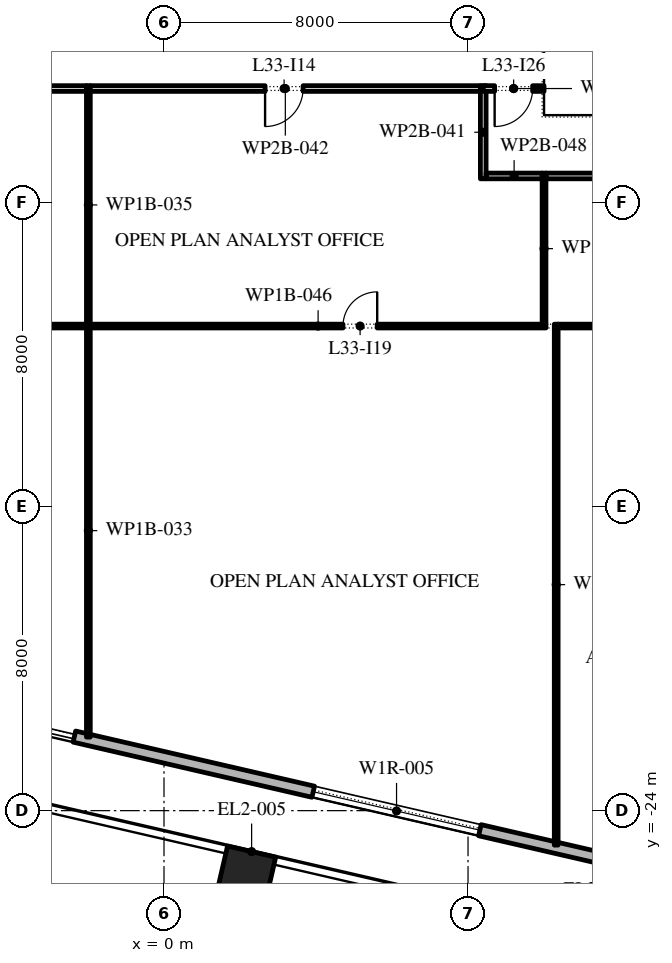
"""IFC4 building model, lengths in metres.
Left out: names, types, materials, properties, quantities, classifications, styles, units other than length and angle.
Written with IfcOpenShell. Run it as: python <this file> out.ifc"""

import sys

from ifc_helpers import new_model, si_unit, direction, frame, frame_2d, origin, origin_2d, place, context, subcontext, project, spatial, rectangle, extrude, element, fill, save


model = new_model("IFC4")
c1 = context("Model", 3, precision=1e-05, world=origin(), true_north=direction((0.0, 1.0)))
c2 = subcontext(c1, "Body", "Model", "MODEL_VIEW")
j1 = project(units=[si_unit("LENGTHUNIT", "METRE"), si_unit("PLANEANGLEUNIT", "RADIAN")], contexts=[c1])
p1 = place(None, origin())
s1 = spatial("IfcSite", under=j1, at=p1, CompositionType="ELEMENT")
p2 = place(p1, origin())
s2 = spatial("IfcBuilding", under=s1, at=p2, CompositionType="ELEMENT")
p3 = place(p2, frame((0.0, 0.0, 151.8)))
s3 = spatial("IfcBuildingStorey", under=s2, at=p3, CompositionType="ELEMENT", Elevation=151.8)
p4 = place(p3, frame((2.159, -25.711, 0.0), z_axis=(0.0, 0.0, 1.0), x_axis=(0.974370064785, -0.224951054344, 0.0)))
e1 = element("IfcColumn", 1, at=p4, inside=s3, PredefinedType="COLUMN", context=c2, shape_type="SweptSolid", body=[
    extrude(rectangle(XDim=1.3, YDim=1.3, at=origin_2d()), origin(), (0.0, 0.0, 1.0), 4.2),
])
p5 = place(p3, frame((-31.078, -15.421, 0.0), z_axis=(0.0, 0.0, 1.0), x_axis=(0.974370456532, -0.224949357493, 0.0)))
e2 = element("IfcWall", 2, at=p5, inside=s3, PredefinedType="STANDARD", context=c2, shape_type="SweptSolid", body=[
    extrude(rectangle(XDim=51.0, YDim=0.3, at=frame_2d((25.5, 0.0))), origin(), (0.0, 0.0, 1.0), 3.95),
])
p6 = place(p5, frame((1.875, 0.0, 0.45)))
e3 = element("IfcOpeningElement", 3, at=p6, cuts=e2, PredefinedType="OPENING", context=c2, shape_type="SweptSolid", body=[
    extrude(rectangle(XDim=4.5, YDim=2.525, at=frame_2d((2.25, 1.262))), frame((0.0, 0.16, 0.0), z_axis=(0.0, -1.0, 0.0), x_axis=(1.0, 0.0, 0.0)), (0.0, 0.0, 1.0), 0.32),
])
p7 = place(p5, frame((10.275, 0.0, 0.45)))
e4 = element("IfcOpeningElement", 4, at=p7, cuts=e2, PredefinedType="OPENING", context=c2, shape_type="SweptSolid", body=[
    extrude(rectangle(XDim=4.5, YDim=2.525, at=frame_2d((2.25, 1.262))), frame((0.0, 0.16, 0.0), z_axis=(0.0, -1.0, 0.0), x_axis=(1.0, 0.0, 0.0)), (0.0, 0.0, 1.0), 0.32),
])
p8 = place(p5, frame((18.825, 0.0, 0.45)))
e5 = element("IfcOpeningElement", 5, at=p8, cuts=e2, PredefinedType="OPENING", context=c2, shape_type="SweptSolid", body=[
    extrude(rectangle(XDim=4.5, YDim=2.4, at=frame_2d((2.25, 1.2))), frame((0.0, 0.16, 0.0), z_axis=(0.0, -1.0, 0.0), x_axis=(1.0, 0.0, 0.0)), (0.0, 0.0, 1.0), 0.32),
])
p9 = place(p5, frame((27.075, 0.0, 0.0)))
e6 = element("IfcOpeningElement", 6, at=p9, cuts=e2, PredefinedType="OPENING", context=c2, shape_type="SweptSolid", body=[
    extrude(rectangle(XDim=2.4, YDim=2.85, at=frame_2d((1.2, 1.425))), frame((0.0, 0.16, 0.0), z_axis=(0.0, -1.0, 0.0), x_axis=(1.0, 0.0, 0.0)), (0.0, 0.0, 1.0), 0.32),
])
p10 = place(p5, frame((35.925, 0.0, 0.45)))
e7 = element("IfcOpeningElement", 7, at=p10, cuts=e2, PredefinedType="OPENING", context=c2, shape_type="SweptSolid", body=[
    extrude(rectangle(XDim=4.5, YDim=2.4, at=frame_2d((2.25, 1.2))), frame((0.0, 0.16, 0.0), z_axis=(0.0, -1.0, 0.0), x_axis=(1.0, 0.0, 0.0)), (0.0, 0.0, 1.0), 0.32),
])
p11 = place(p5, frame((44.475, 0.0, 0.45)))
e8 = element("IfcOpeningElement", 8, at=p11, cuts=e2, PredefinedType="OPENING", context=c2, shape_type="SweptSolid", body=[
    extrude(rectangle(XDim=4.5, YDim=2.4, at=frame_2d((2.25, 1.2))), frame((0.0, 0.16, 0.0), z_axis=(0.0, -1.0, 0.0), x_axis=(1.0, 0.0, 0.0)), (0.0, 0.0, 1.0), 0.32),
])
p12 = place(p3, frame((-1.99, -22.065, 0.0), z_axis=(0.0, 0.0, 1.0), x_axis=(0.0, 1.0, 0.0)))
e9 = element("IfcWall", 9, at=p12, inside=s3, PredefinedType="PARTITIONING", context=c2, shape_type="SweptSolid", body=[
    extrude(rectangle(XDim=10.865, YDim=0.1, at=frame_2d((5.433, 0.0))), origin(), (0.0, 0.0, 1.0), 3.95),
])
p13 = place(p3, frame((-2.04, -11.25, 0.0), z_axis=(0.0, 0.0, 1.0), x_axis=(-1.0, 0.0, 0.0)))
e10 = element("IfcWall", 10, at=p13, inside=s3, PredefinedType="PARTITIONING", context=c2, shape_type="SweptSolid", body=[
    extrude(rectangle(XDim=8.23, YDim=0.1, at=frame_2d((4.115, 0.0))), origin(), (0.0, 0.0, 1.0), 3.95),
])
p14 = place(p13, frame((5.43, 0.0, 0.0)))
e11 = element("IfcOpeningElement", 11, at=p14, cuts=e10, PredefinedType="OPENING", context=c2, shape_type="SweptSolid", body=[
    extrude(rectangle(XDim=0.9, YDim=2.1, at=frame_2d((0.45, 1.05))), frame((0.0, 0.06, 0.0), z_axis=(0.0, -1.0, 0.0), x_axis=(1.0, 0.0, 0.0)), (0.0, 0.0, 1.0), 0.12),
])
p15 = place(p3, frame((-1.99, -11.2, 0.0), z_axis=(0.0, 0.0, 1.0), x_axis=(0.0, 1.0, 0.0)))
e12 = element("IfcWall", 12, at=p15, inside=s3, PredefinedType="PARTITIONING", context=c2, shape_type="SweptSolid", body=[
    extrude(rectangle(XDim=6.275, YDim=0.1, at=frame_2d((3.137, 0.0))), origin(), (0.0, 0.0, 1.0), 3.95),
])
p16 = place(p3, frame((-2.04, -5.0, 0.0), z_axis=(0.0, 0.0, 1.0), x_axis=(-1.0, 0.0, 0.0)))
e13 = element("IfcWall", 13, at=p16, inside=s3, PredefinedType="PARTITIONING", context=c2, shape_type="SweptSolid", body=[
    extrude(rectangle(XDim=6.285, YDim=0.15, at=frame_2d((3.143, 0.0))), origin(), (0.0, 0.0, 1.0), 3.95),
])
p17 = place(p3, frame((8.4, -7.375, 0.0), z_axis=(0.0, 0.0, 1.0), x_axis=(0.0, 1.0, 0.0)))
e14 = element("IfcWall", 14, at=p17, inside=s3, PredefinedType="PARTITIONING", context=c2, shape_type="SweptSolid", body=[
    extrude(rectangle(XDim=2.45, YDim=0.15, at=frame_2d((1.225, 0.0))), origin(), (0.0, 0.0, 1.0), 3.95),
])
p18 = place(p3, frame((8.325, -5.0, 0.0), z_axis=(0.0, 0.0, 1.0), x_axis=(-1.0, 0.0, 0.0)))
e15 = element("IfcWall", 15, at=p18, inside=s3, PredefinedType="PARTITIONING", context=c2, shape_type="SweptSolid", body=[
    extrude(rectangle(XDim=10.265, YDim=0.15, at=frame_2d((5.132, 0.0))), origin(), (0.0, 0.0, 1.0), 3.95),
])
p19 = place(p18, frame((4.665, 0.0, 0.0)))
e16 = element("IfcOpeningElement", 16, at=p19, cuts=e15, PredefinedType="OPENING", context=c2, shape_type="SweptSolid", body=[
    extrude(rectangle(XDim=1.0, YDim=2.1, at=frame_2d((0.5, 1.05))), frame((0.0, 0.085, 0.0), z_axis=(0.0, -1.0, 0.0), x_axis=(1.0, 0.0, 0.0)), (0.0, 0.0, 1.0), 0.17),
])
p20 = place(p3, frame((10.05, -11.25, 0.0), z_axis=(0.0, 0.0, 1.0), x_axis=(-1.0, 0.0, 0.0)))
e17 = element("IfcWall", 17, at=p20, inside=s3, PredefinedType="PARTITIONING", context=c2, shape_type="SweptSolid", body=[
    extrude(rectangle(XDim=11.99, YDim=0.1, at=frame_2d((5.995, 0.0))), origin(), (0.0, 0.0, 1.0), 3.95),
])
p21 = place(p20, frame((4.44, 0.0, 0.0)))
e18 = element("IfcOpeningElement", 18, at=p21, cuts=e17, PredefinedType="OPENING", context=c2, shape_type="SweptSolid", body=[
    extrude(rectangle(XDim=0.9, YDim=2.1, at=frame_2d((0.45, 1.05))), frame((0.0, 0.06, 0.0), z_axis=(0.0, -1.0, 0.0), x_axis=(1.0, 0.0, 0.0)), (0.0, 0.0, 1.0), 0.12),
])
p22 = place(p3, frame((10.0, -11.2, 0.0), z_axis=(0.0, 0.0, 1.0), x_axis=(0.0, 1.0, 0.0)))
e19 = element("IfcWall", 19, at=p22, inside=s3, PredefinedType="PARTITIONING", context=c2, shape_type="SweptSolid", body=[
    extrude(rectangle(XDim=3.975, YDim=0.1, at=frame_2d((1.987, 0.0))), origin(), (0.0, 0.0, 1.0), 3.95),
])
p23 = place(p3, frame((9.95, -7.3, 0.0), z_axis=(0.0, 0.0, 1.0), x_axis=(-1.0, 0.0, 0.0)))
e20 = element("IfcWall", 20, at=p23, inside=s3, PredefinedType="PARTITIONING", context=c2, shape_type="SweptSolid", body=[
    extrude(rectangle(XDim=1.475, YDim=0.15, at=frame_2d((0.737, 0.0))), origin(), (0.0, 0.0, 1.0), 3.95),
])
p24 = place(p3, frame((10.32, -24.907, 0.0), z_axis=(0.0, 0.0, 1.0), x_axis=(0.0, 1.0, 0.0)))
e21 = element("IfcWall", 21, at=p24, inside=s3, PredefinedType="PARTITIONING", context=c2, shape_type="SweptSolid", body=[
    extrude(rectangle(XDim=13.707, YDim=0.1, at=frame_2d((6.854, 0.0))), origin(), (0.0, 0.0, 1.0), 3.95),
])
p25 = place(p3, frame((18.6, -11.25, 0.0), z_axis=(0.0, 0.0, 1.0), x_axis=(-1.0, 0.0, 0.0)))
e22 = element("IfcWall", 22, at=p25, inside=s3, PredefinedType="PARTITIONING", context=c2, shape_type="SweptSolid", body=[
    extrude(rectangle(XDim=8.23, YDim=0.1, at=frame_2d((4.115, 0.0))), origin(), (0.0, 0.0, 1.0), 3.95),
])
p26 = place(p25, frame((1.93, 0.0, 0.0)))
e23 = element("IfcOpeningElement", 23, at=p26, cuts=e22, PredefinedType="OPENING", context=c2, shape_type="SweptSolid", body=[
    extrude(rectangle(XDim=0.9, YDim=2.1, at=frame_2d((0.45, 1.05))), frame((0.0, 0.06, 0.0), z_axis=(0.0, -1.0, 0.0), x_axis=(1.0, 0.0, 0.0)), (0.0, 0.0, 1.0), 0.12),
])
p27 = place(p3, frame((23.675, -7.3, 0.0), z_axis=(0.0, 0.0, 1.0), x_axis=(-1.0, 0.0, 0.0)))
e24 = element("IfcWall", 24, at=p27, inside=s3, PredefinedType="PARTITIONING", context=c2, shape_type="SweptSolid", body=[
    extrude(rectangle(XDim=13.625, YDim=0.15, at=frame_2d((6.812, 0.0))), origin(), (0.0, 0.0, 1.0), 3.95),
])
p28 = place(p27, frame((9.025, 0.0, 0.0)))
e25 = element("IfcOpeningElement", 25, at=p28, cuts=e24, PredefinedType="OPENING", context=c2, shape_type="SweptSolid", body=[
    extrude(rectangle(XDim=1.0, YDim=2.1, at=frame_2d((0.5, 1.05))), frame((0.0, 0.085, 0.0), z_axis=(0.0, -1.0, 0.0), x_axis=(1.0, 0.0, 0.0)), (0.0, 0.0, 1.0), 0.17),
])
p29 = place(p3, frame((10.0, -5.0, 0.0), z_axis=(0.0, 0.0, 1.0), x_axis=(-1.0, 0.0, 0.0)))
e26 = element("IfcWall", 26, at=p29, inside=s3, PredefinedType="PARTITIONING", context=c2, shape_type="SweptSolid", body=[
    extrude(rectangle(XDim=1.6, YDim=0.15, at=frame_2d((0.8, 0.0))), origin(), (0.0, 0.0, 1.0), 3.95),
])
p30 = place(p29, frame((0.3, 0.0, 0.0)))
e27 = element("IfcOpeningElement", 27, at=p30, cuts=e26, PredefinedType="OPENING", context=c2, shape_type="SweptSolid", body=[
    extrude(rectangle(XDim=1.0, YDim=2.1, at=frame_2d((0.5, 1.05))), frame((0.0, 0.085, 0.0), z_axis=(0.0, -1.0, 0.0), x_axis=(1.0, 0.0, 0.0)), (0.0, 0.0, 1.0), 0.17),
])
p31 = place(p9, origin())
e28 = element("IfcDoor", 28, at=p31, inside=s3, OperationType="DOUBLE_DOOR_SLIDING", PredefinedType="DOOR", context=c2, shape_type="SweptSolid", body=[
    extrude(rectangle(XDim=2.4, YDim=2.85, at=frame_2d((1.2, 1.425))), frame((0.0, 0.025, 0.0), z_axis=(0.0, -1.0, 0.0), x_axis=(1.0, 0.0, 0.0)), (0.0, 0.0, 1.0), 0.05),
])
fill(e6, e28)
p32 = place(p10, origin())
e29 = element("IfcWindow", 29, at=p32, inside=s3, PartitioningType="DOUBLE_PANEL_VERTICAL", PredefinedType="WINDOW", context=c2, shape_type="SweptSolid", body=[
    extrude(rectangle(XDim=4.5, YDim=2.4, at=frame_2d((2.25, 1.2))), frame((0.0, 0.03, 0.0), z_axis=(0.0, -1.0, 0.0), x_axis=(1.0, 0.0, 0.0)), (0.0, 0.0, 1.0), 0.06),
])
fill(e7, e29)
p33 = place(p19, origin())
e30 = element("IfcDoor", 30, at=p33, inside=s3, OperationType="SINGLE_SWING_LEFT", PredefinedType="DOOR", context=c2, shape_type="SweptSolid", body=[
    extrude(rectangle(XDim=1.0, YDim=2.1, at=frame_2d((0.5, 1.05))), frame((0.0, 0.025, 0.0), z_axis=(0.0, -1.0, 0.0), x_axis=(1.0, 0.0, 0.0)), (0.0, 0.0, 1.0), 0.05),
])
fill(e16, e30)
p34 = place(p21, frame((0.9, 0.0, 0.0), z_axis=(0.0, 0.0, 1.0), x_axis=(-1.0, 0.0, 0.0)))
e31 = element("IfcDoor", 31, at=p34, inside=s3, OperationType="SINGLE_SWING_LEFT", PredefinedType="DOOR", context=c2, shape_type="SweptSolid", body=[
    extrude(rectangle(XDim=0.9, YDim=2.1, at=frame_2d((0.45, 1.05))), frame((0.0, 0.025, 0.0), z_axis=(0.0, -1.0, 0.0), x_axis=(1.0, 0.0, 0.0)), (0.0, 0.0, 1.0), 0.05),
])
fill(e18, e31)
p35 = place(p30, origin())
e32 = element("IfcDoor", 32, at=p35, inside=s3, OperationType="SINGLE_SWING_LEFT", PredefinedType="DOOR", context=c2, shape_type="SweptSolid", body=[
    extrude(rectangle(XDim=1.0, YDim=2.1, at=frame_2d((0.5, 1.05))), frame((0.0, 0.025, 0.0), z_axis=(0.0, -1.0, 0.0), x_axis=(1.0, 0.0, 0.0)), (0.0, 0.0, 1.0), 0.05),
])
fill(e27, e32)
save(model, sys.argv[1])
